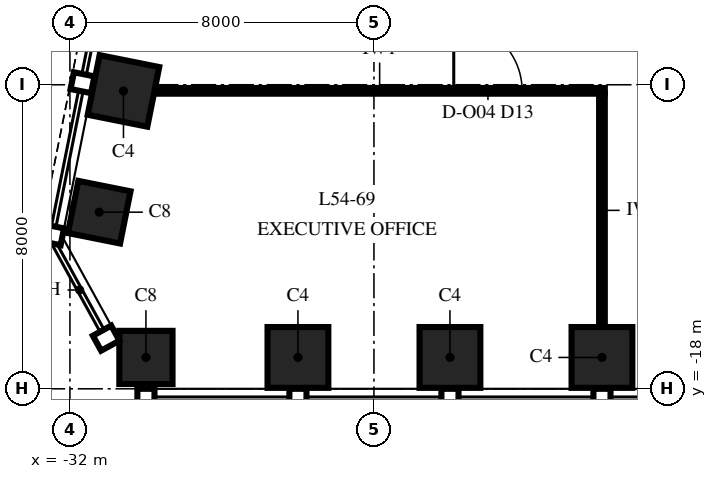
"""IFC4 building model, lengths in metres.
Left out: names, types, materials, properties, quantities, classifications, styles, units other than length and angle.
Written with IfcOpenShell. Run it as: python <this file> out.ifc"""

import sys

from ifc_helpers import new_model, si_unit, direction, frame, frame_2d, origin, origin_2d, place, context, subcontext, project, spatial, rectangle, extrude, element, fill, save


model = new_model("IFC4")
c1 = context("Model", 3, precision=1e-05, world=origin(), true_north=direction((0.0, 1.0)))
c2 = subcontext(c1, "Body", "Model", "MODEL_VIEW")
j1 = project(units=[si_unit("LENGTHUNIT", "METRE"), si_unit("PLANEANGLEUNIT", "RADIAN")], contexts=[c1])
p1 = place(None, origin())
s1 = spatial("IfcSite", under=j1, at=p1, CompositionType="ELEMENT")
p2 = place(p1, origin())
s2 = spatial("IfcBuilding", under=s1, at=p2, CompositionType="ELEMENT")
p3 = place(p2, frame((0.0, 0.0, 234.0)))
s3 = spatial("IfcBuildingStorey", under=s2, at=p3, CompositionType="ELEMENT", Elevation=234.0)
p4 = place(p3, frame((-30.0, -17.175, 0.0), z_axis=(0.0, 0.0, 1.0), x_axis=(1.0, 0.0, 0.0)))
e1 = element("IfcColumn", 1, at=p4, inside=s3, PredefinedType="COLUMN", context=c2, shape_type="SweptSolid", body=[
    extrude(rectangle(XDim=1.4, YDim=1.4, at=origin_2d()), origin(), (0.0, 0.0, 1.0), 4.0),
])
for number, where, z_axis, x_axis in (
    (2, (-26.0, -17.175, 0.0), (0.0, 0.0, 1.0), (1.0, 0.0, 0.0)),
    (3, (-22.0, -17.175, 0.0), (0.0, 0.0, 1.0), (1.0, 0.0, 0.0)),
    (4, (-18.0, -17.175, 0.0), (0.0, 0.0, 1.0), (1.0, 0.0, 0.0)),
    (5, (-30.591, -10.162, 0.0), (0.0, 0.0, 1.0), (-0.196, -0.981, 0.0)),
):
    element("IfcColumn", number, at=place(p3, frame(where, z_axis=z_axis, x_axis=x_axis)), inside=s3, PredefinedType="COLUMN", context=c2, shape_type="SweptSolid", body=[
        extrude(rectangle(XDim=1.6, YDim=1.6, at=origin_2d()), origin(), (0.0, 0.0, 1.0), 4.0),
    ])
p5 = place(p3, frame((-31.229, -13.353, 0.0), z_axis=(0.0, 0.0, 1.0), x_axis=(-0.196116135138, -0.980580675691, 0.0)))
e6 = element("IfcColumn", 6, at=p5, inside=s3, PredefinedType="COLUMN", context=c2, shape_type="SweptSolid", body=[
    extrude(rectangle(XDim=1.4, YDim=1.4, at=origin_2d()), origin(), (0.0, 0.0, 1.0), 4.0),
])
p6 = place(p3, frame((-29.775, -10.16, 0.0), z_axis=(0.0, 0.0, 1.0), x_axis=(1.0, 0.0, 0.0)))
e7 = element("IfcWall", 7, at=p6, inside=s3, PredefinedType="PARTITIONING", context=c2, shape_type="SweptSolid", body=[
    extrude(rectangle(XDim=11.85, YDim=0.15, at=frame_2d((5.925, 0.0))), origin(), (0.0, 0.0, 1.0), 3.25),
])
p7 = place(p6, frame((7.875, 0.0, 0.0)))
e8 = element("IfcOpeningElement", 8, at=p7, cuts=e7, PredefinedType="OPENING", context=c2, shape_type="SweptSolid", body=[
    extrude(rectangle(XDim=1.8, YDim=2.4, at=frame_2d((0.9, 1.2))), frame((0.0, 0.09, 0.0), z_axis=(0.0, -1.0, 0.0), x_axis=(1.0, 0.0, 0.0)), (0.0, 0.0, 1.0), 0.18),
])
p8 = place(p3, frame((-18.0, -16.375, 0.0), z_axis=(0.0, 0.0, 1.0), x_axis=(0.0, 1.0, 0.0)))
e9 = element("IfcWall", 9, at=p8, inside=s3, PredefinedType="PARTITIONING", context=c2, shape_type="SweptSolid", body=[
    extrude(rectangle(XDim=6.14, YDim=0.15, at=frame_2d((3.07, 0.0))), origin(), (0.0, 0.0, 1.0), 3.25),
])
p9 = place(p7, origin())
e10 = element("IfcDoor", 10, at=p9, inside=s3, OperationType="DOUBLE_DOOR_SINGLE_SWING", PredefinedType="DOOR", context=c2, shape_type="SweptSolid", body=[
    extrude(rectangle(XDim=1.8, YDim=2.4, at=frame_2d((0.9, 1.2))), frame((0.0, 0.075, 0.0), z_axis=(0.0, -1.0, 0.0), x_axis=(1.0, 0.0, 0.0)), (0.0, 0.0, 1.0), 0.149),
])
fill(e8, e10)
save(model, sys.argv[1])
